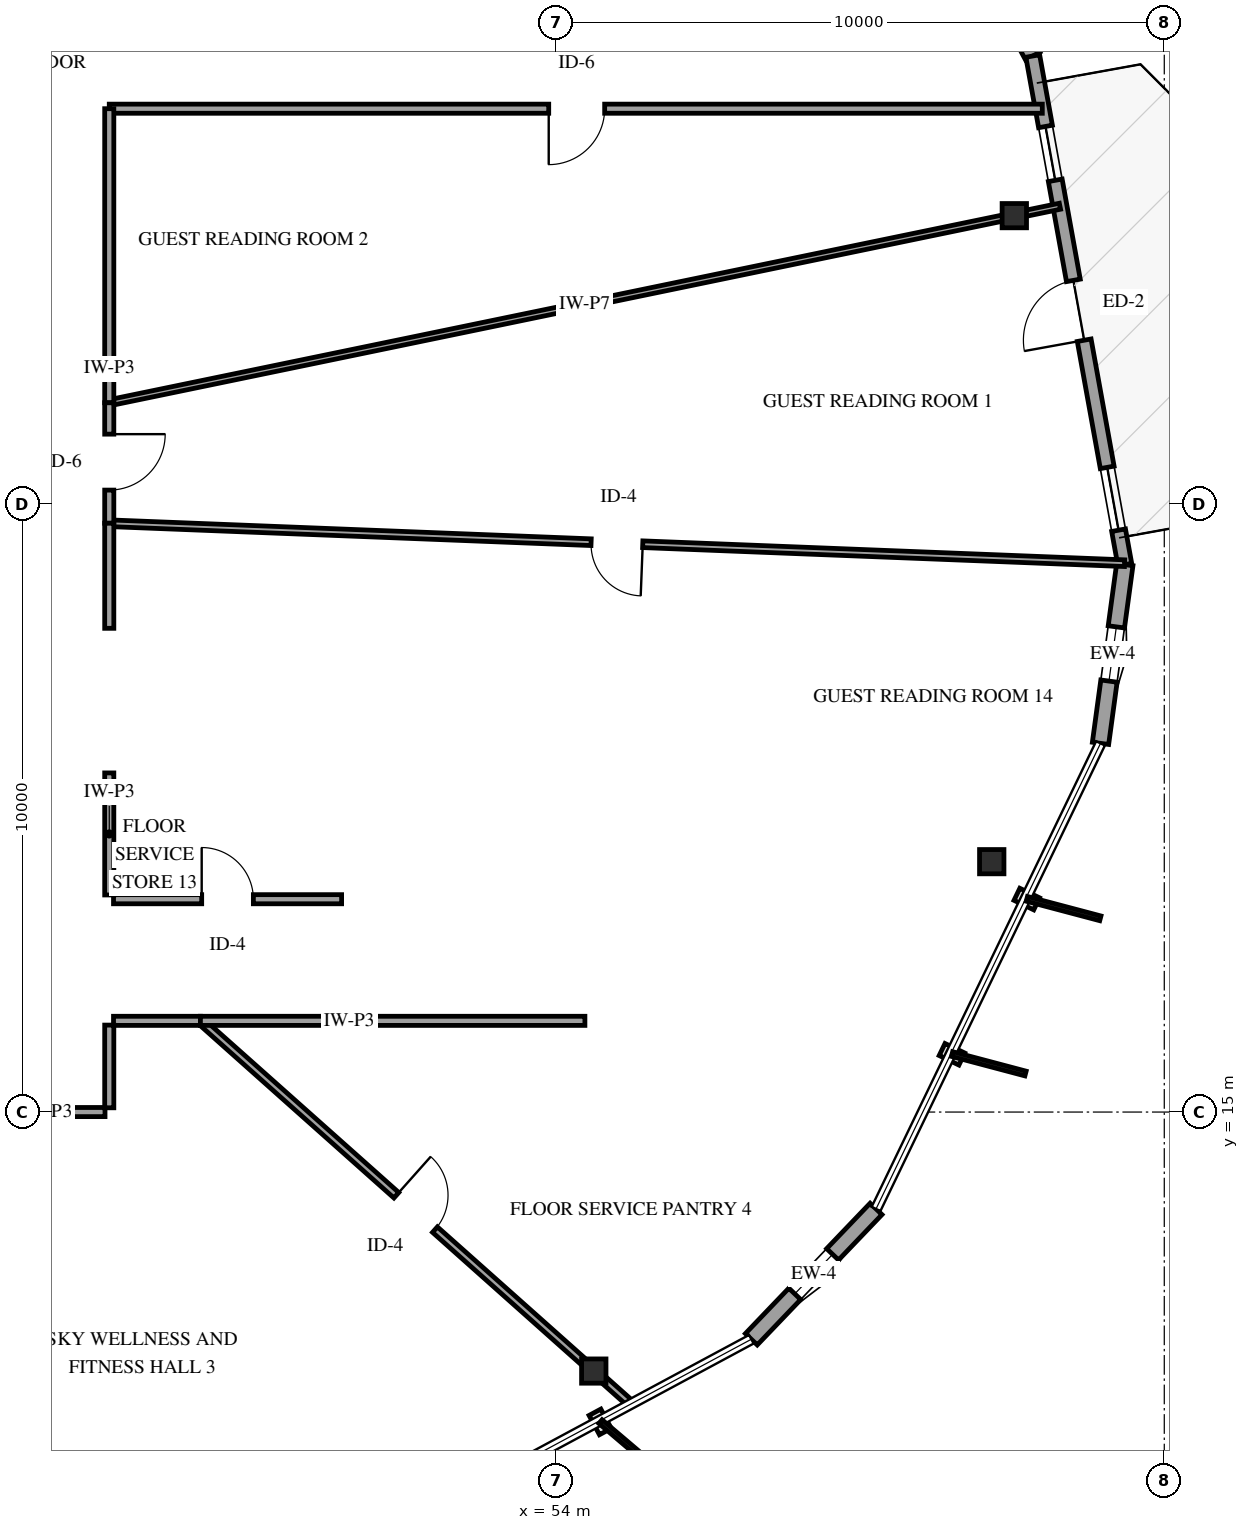
"""IFC4 building model, lengths in metres.
Left out: names, types, materials, properties, quantities, classifications, styles, units other than length and angle.
Written with IfcOpenShell. Run it as: python <this file> out.ifc"""

import sys

from ifc_helpers import new_model, si_unit, direction, frame, frame_2d, origin, origin_2d, place, context, subcontext, project, spatial, rectangle, i_section, extrude, element, fill, save


model = new_model("IFC4")
c1 = context("Model", 3, precision=1e-05, world=origin(), true_north=direction((0.0, 1.0)))
c2 = subcontext(c1, "Body", "Model", "MODEL_VIEW")
j1 = project(units=[si_unit("LENGTHUNIT", "METRE"), si_unit("PLANEANGLEUNIT", "RADIAN")], contexts=[c1])
p1 = place(None, origin())
s1 = spatial("IfcSite", under=j1, at=p1, CompositionType="ELEMENT")
p2 = place(p1, origin())
s2 = spatial("IfcBuilding", under=s1, at=p2, CompositionType="ELEMENT")
p3 = place(p2, frame((0.0, 0.0, 268.75)))
s3 = spatial("IfcBuildingStorey", under=s2, at=p3, CompositionType="ELEMENT", Elevation=268.75)
for number, where, z_axis, x_axis in (
    (1, (61.534, 29.741, 0.0), (0.0, 0.0, 1.0), (1.0, 0.0, 0.0)),
    (2, (54.618, 10.74, 0.0), (0.0, 0.0, 1.0), (1.0, 0.0, 0.0)),
    (3, (61.163, 19.117, 0.0), (0.0, 0.0, 1.0), (1.0, 0.0, 0.0)),
):
    element("IfcColumn", number, at=place(p3, frame(where, z_axis=z_axis, x_axis=x_axis)), inside=s3, PredefinedType="COLUMN", context=c2, shape_type="SweptSolid", body=[
        extrude(i_section(OverallWidth=0.401, OverallDepth=0.399, WebThickness=0.025, FlangeThickness=0.04, FilletRadius=0.038, at=origin_2d()), origin(), (0.0, 0.0, 1.0), 3.75),
    ])
p4 = place(p3, frame((57.209, 11.263, 0.0), z_axis=(0.0, 0.0, 1.0), x_axis=(0.691381456172, 0.722489918311, 0.0)))
e4 = element("IfcWall", 4, at=p4, inside=s3, PredefinedType="SOLIDWALL", context=c2, shape_type="SweptSolid", body=[
    extrude(rectangle(XDim=2.967, YDim=0.27, at=frame_2d((1.483, 0.0))), origin(), (0.0, 0.0, 1.0), 2.829),
])
p5 = place(p4, frame((1.033, 0.0, 0.75)))
e5 = element("IfcOpeningElement", 5, at=p5, cuts=e4, PredefinedType="OPENING", context=c2, shape_type="SweptSolid", body=[
    extrude(rectangle(XDim=0.9, YDim=1.5, at=frame_2d((0.45, 0.75))), frame((0.0, 0.145, 0.0), z_axis=(0.0, -1.0, 0.0), x_axis=(1.0, 0.0, 0.0)), (0.0, 0.0, 1.0), 0.29),
])
p6 = place(p3, frame((62.951, 21.063, 0.0), z_axis=(0.0, 0.0, 1.0), x_axis=(0.134643093572, 0.99089416052, 0.0)))
e6 = element("IfcWall", 6, at=p6, inside=s3, PredefinedType="SOLIDWALL", context=c2, shape_type="SweptSolid", body=[
    extrude(rectangle(XDim=2.967, YDim=0.27, at=frame_2d((1.483, 0.0))), origin(), (0.0, 0.0, 1.0), 2.829),
])
p7 = place(p6, frame((1.033, 0.0, 0.75)))
e7 = element("IfcOpeningElement", 7, at=p7, cuts=e6, PredefinedType="OPENING", context=c2, shape_type="SweptSolid", body=[
    extrude(rectangle(XDim=0.9, YDim=1.5, at=frame_2d((0.45, 0.75))), frame((0.0, 0.145, 0.0), z_axis=(0.0, -1.0, 0.0), x_axis=(1.0, 0.0, 0.0)), (0.0, 0.0, 1.0), 0.29),
])
p8 = place(p3, frame((61.837, 32.367, 0.0), z_axis=(0.0, 0.0, 1.0), x_axis=(-0.473486214629, 0.880801228744, 0.0)))
e8 = element("IfcWall", 8, at=p8, inside=s3, PredefinedType="SOLIDWALL", context=c2, shape_type="SweptSolid", body=[
    extrude(rectangle(XDim=2.966, YDim=0.27, at=frame_2d((1.483, 0.0))), origin(), (0.0, 0.0, 1.0), 2.829),
])
p9 = place(p3, frame((63.351, 24.003, 0.0), z_axis=(0.0, 0.0, 1.0), x_axis=(-0.178109410328, 0.984010689958, 0.0)))
e9 = element("IfcWall", 9, at=p9, inside=s3, PredefinedType="SOLIDWALL", context=c2, shape_type="SweptSolid", body=[
    extrude(rectangle(XDim=8.5, YDim=0.23, at=frame_2d((4.25, 0.0))), origin(), (0.0, 0.0, 1.0), 2.829),
])
p10 = place(p9, frame((3.75, 0.0, 0.0)))
e10 = element("IfcOpeningElement", 10, at=p10, cuts=e9, PredefinedType="OPENING", context=c2, shape_type="SweptSolid", body=[
    extrude(rectangle(XDim=1.0, YDim=2.15, at=frame_2d((0.5, 1.075))), frame((0.0, 0.125, 0.0), z_axis=(0.0, -1.0, 0.0), x_axis=(1.0, 0.0, 0.0)), (0.0, 0.0, 1.0), 0.25),
])
p11 = place(p9, frame((0.575, 0.0, 0.72)))
e11 = element("IfcOpeningElement", 11, at=p11, cuts=e9, PredefinedType="OPENING", context=c2, shape_type="SweptSolid", body=[
    extrude(rectangle(XDim=1.05, YDim=1.55, at=frame_2d((0.525, 0.775))), frame((0.0, 0.125, 0.0), z_axis=(0.0, -1.0, 0.0), x_axis=(1.0, 0.0, 0.0)), (0.0, 0.0, 1.0), 0.25),
])
p12 = place(p9, frame((6.422, 0.0, 0.72)))
e12 = element("IfcOpeningElement", 12, at=p12, cuts=e9, PredefinedType="OPENING", context=c2, shape_type="SweptSolid", body=[
    extrude(rectangle(XDim=0.9, YDim=1.5, at=frame_2d((0.45, 0.75))), frame((0.0, 0.125, 0.0), z_axis=(0.0, -1.0, 0.0), x_axis=(1.0, 0.0, 0.0)), (0.0, 0.0, 1.0), 0.25),
])
p13 = place(p3, frame((63.347, 24.026, 0.0), z_axis=(0.0, 0.0, 1.0), x_axis=(-0.999226219276, 0.039331446861, 0.0)))
e13 = element("IfcWall", 13, at=p13, inside=s3, PredefinedType="PARTITIONING", context=c2, shape_type="SweptSolid", body=[
    extrude(rectangle(XDim=16.71, YDim=0.11, at=frame_2d((8.355, 0.0))), origin(), (0.0, 0.0, 1.0), 3.45),
])
p14 = place(p13, frame((7.93, 0.0, 0.0)))
e14 = element("IfcOpeningElement", 14, at=p14, cuts=e13, PredefinedType="OPENING", context=c2, shape_type="SweptSolid", body=[
    extrude(rectangle(XDim=0.85, YDim=2.1, at=frame_2d((0.425, 1.05))), frame((0.0, 0.065, 0.0), z_axis=(0.0, -1.0, 0.0), x_axis=(1.0, 0.0, 0.0)), (0.0, 0.0, 1.0), 0.13),
])
p15 = place(p3, frame((46.65, 26.664, 0.0), z_axis=(0.0, 0.0, 1.0), x_axis=(0.979293886002, 0.202443781921, 0.0)))
e15 = element("IfcWall", 15, at=p15, inside=s3, PredefinedType="PARTITIONING", context=c2, shape_type="SweptSolid", body=[
    extrude(rectangle(XDim=15.965, YDim=0.1, at=frame_2d((7.982, 0.0))), origin(), (0.0, 0.0, 1.0), 2.745),
])
p16 = place(p3, frame((61.994, 31.5, 0.0), z_axis=(0.0, 0.0, 1.0), x_axis=(-1.0, 0.0, 0.0)))
e16 = element("IfcWall", 16, at=p16, inside=s3, PredefinedType="PARTITIONING", context=c2, shape_type="SweptSolid", body=[
    extrude(rectangle(XDim=15.344, YDim=0.15, at=frame_2d((7.672, 0.0))), origin(), (0.0, 0.0, 1.0), 2.824),
])
p17 = place(p16, frame((7.197, 0.0, 0.0)))
e17 = element("IfcOpeningElement", 17, at=p17, cuts=e16, PredefinedType="OPENING", context=c2, shape_type="SweptSolid", body=[
    extrude(rectangle(XDim=0.92, YDim=2.12, at=frame_2d((0.46, 1.06))), frame((0.0, 0.085, 0.0), z_axis=(0.0, -1.0, 0.0), x_axis=(1.0, 0.0, 0.0)), (0.0, 0.0, 1.0), 0.17),
])
p18 = place(p3, frame((48.149, 16.5, 0.0), z_axis=(0.0, 0.0, 1.0), x_axis=(0.746964286296, -0.664864162816, 0.0)))
e18 = element("IfcWall", 18, at=p18, inside=s3, PredefinedType="PARTITIONING", context=c2, shape_type="SweptSolid", body=[
    extrude(rectangle(XDim=9.477, YDim=0.12, at=frame_2d((4.739, 0.0))), origin(), (0.0, 0.0, 1.0), 3.45),
])
p19 = place(p18, frame((4.314, 0.0, 0.0)))
e19 = element("IfcOpeningElement", 19, at=p19, cuts=e18, PredefinedType="OPENING", context=c2, shape_type="SweptSolid", body=[
    extrude(rectangle(XDim=0.85, YDim=2.1, at=frame_2d((0.425, 1.05))), frame((0.0, 0.07, 0.0), z_axis=(0.0, -1.0, 0.0), x_axis=(1.0, 0.0, 0.0)), (0.0, 0.0, 1.0), 0.14),
])
p20 = place(p3, frame((46.65, 31.5, 0.0), z_axis=(0.0, 0.0, 1.0), x_axis=(0.0, -1.0, 0.0)))
e20 = element("IfcWall", 20, at=p20, inside=s3, PredefinedType="PARTITIONING", context=c2, shape_type="SweptSolid", body=[
    extrude(rectangle(XDim=4.836, YDim=0.15, at=frame_2d((2.418, 0.0))), origin(), (0.0, 0.0, 1.0), 3.45),
])
p21 = place(p3, frame((46.65, 26.664, 0.0), z_axis=(0.0, 0.0, 1.0), x_axis=(0.0, -1.0, 0.0)))
e21 = element("IfcWall", 21, at=p21, inside=s3, PredefinedType="PARTITIONING", context=c2, shape_type="SweptSolid", body=[
    extrude(rectangle(XDim=1.981, YDim=0.15, at=frame_2d((0.99, 0.0))), origin(), (0.0, 0.0, 1.0), 3.45),
])
p22 = place(p21, frame((0.516, 0.0, 0.0)))
e22 = element("IfcOpeningElement", 22, at=p22, cuts=e21, PredefinedType="OPENING", context=c2, shape_type="SweptSolid", body=[
    extrude(rectangle(XDim=0.92, YDim=2.12, at=frame_2d((0.46, 1.06))), frame((0.0, 0.085, 0.0), z_axis=(0.0, -1.0, 0.0), x_axis=(1.0, 0.0, 0.0)), (0.0, 0.0, 1.0), 0.17),
])
p23 = place(p3, frame((46.58, 15.0, 0.0), z_axis=(0.0, 0.0, 1.0), x_axis=(-1.0, 0.0, 0.0)))
e23 = element("IfcWall", 23, at=p23, inside=s3, PredefinedType="PARTITIONING", context=c2, shape_type="SweptSolid", body=[
    extrude(rectangle(XDim=1.91, YDim=0.15, at=frame_2d((0.955, 0.0))), origin(), (0.0, 0.0, 1.0), 3.45),
])
p24 = place(p3, frame((48.149, 16.5, 0.0), z_axis=(0.0, 0.0, 1.0), x_axis=(-1.0, 0.0, 0.0)))
e24 = element("IfcWall", 24, at=p24, inside=s3, PredefinedType="PARTITIONING", context=c2, shape_type="SweptSolid", body=[
    extrude(rectangle(XDim=1.429, YDim=0.15, at=frame_2d((0.714, 0.0))), origin(), (0.0, 0.0, 1.0), 2.828),
])
p25 = place(p3, frame((46.65, 16.43, 0.0), z_axis=(0.0, 0.0, 1.0), x_axis=(0.0, -1.0, 0.0)))
e25 = element("IfcWall", 25, at=p25, inside=s3, PredefinedType="PARTITIONING", context=c2, shape_type="SweptSolid", body=[
    extrude(rectangle(XDim=1.36, YDim=0.15, at=frame_2d((0.68, 0.0))), origin(), (0.0, 0.0, 1.0), 3.45),
])
p26 = place(p3, frame((54.472, 16.5, 0.0), z_axis=(0.0, 0.0, 1.0), x_axis=(-1.0, 0.0, 0.0)))
e26 = element("IfcWall", 26, at=p26, inside=s3, PredefinedType="PARTITIONING", context=c2, shape_type="SweptSolid", body=[
    extrude(rectangle(XDim=6.323, YDim=0.15, at=frame_2d((3.162, 0.0))), origin(), (0.0, 0.0, 1.0), 2.828),
])
p27 = place(p3, frame((46.72, 18.5, 0.0), z_axis=(0.0, 0.0, 1.0), x_axis=(1.0, 0.0, 0.0)))
e27 = element("IfcWall", 27, at=p27, inside=s3, PredefinedType="PARTITIONING", context=c2, shape_type="SweptSolid", body=[
    extrude(rectangle(XDim=3.751, YDim=0.15, at=frame_2d((1.875, 0.0))), origin(), (0.0, 0.0, 1.0), 2.745),
])
p28 = place(p27, frame((1.45, 0.0, 0.0)))
e28 = element("IfcOpeningElement", 28, at=p28, cuts=e27, PredefinedType="OPENING", context=c2, shape_type="SweptSolid", body=[
    extrude(rectangle(XDim=0.85, YDim=2.1, at=frame_2d((0.425, 1.05))), frame((0.0, 0.085, 0.0), z_axis=(0.0, -1.0, 0.0), x_axis=(1.0, 0.0, 0.0)), (0.0, 0.0, 1.0), 0.17),
])
p29 = place(p3, frame((46.65, 20.577, 0.0), z_axis=(0.0, 0.0, 1.0), x_axis=(0.0, -1.0, 0.0)))
e29 = element("IfcWall", 29, at=p29, inside=s3, PredefinedType="PARTITIONING", context=c2, shape_type="SweptSolid", body=[
    extrude(rectangle(XDim=2.007, YDim=0.15, at=frame_2d((1.003, 0.0))), origin(), (0.0, 0.0, 1.0), 3.45),
])
p30 = place(p3, frame((46.65, 24.683, 0.0), z_axis=(0.0, 0.0, 1.0), x_axis=(0.0, -1.0, 0.0)))
e30 = element("IfcWall", 30, at=p30, inside=s3, PredefinedType="PARTITIONING", context=c2, shape_type="SweptSolid", body=[
    extrude(rectangle(XDim=1.728, YDim=0.15, at=frame_2d((0.864, 0.0))), origin(), (0.0, 0.0, 1.0), 3.45),
])
p31 = place(p5, origin())
e31 = element("IfcWindow", 31, at=p31, inside=s3, PartitioningType="SINGLE_PANEL", PredefinedType="WINDOW", context=c2, shape_type="SweptSolid", body=[
    extrude(rectangle(XDim=0.9, YDim=1.5, at=frame_2d((0.45, 0.75))), frame((0.0, 0.03, 0.0), z_axis=(0.0, -1.0, 0.0), x_axis=(1.0, 0.0, 0.0)), (0.0, 0.0, 1.0), 0.06),
])
fill(e5, e31)
p32 = place(p7, origin())
e32 = element("IfcWindow", 32, at=p32, inside=s3, PartitioningType="SINGLE_PANEL", PredefinedType="WINDOW", context=c2, shape_type="SweptSolid", body=[
    extrude(rectangle(XDim=0.9, YDim=1.5, at=frame_2d((0.45, 0.75))), frame((0.0, 0.03, 0.0), z_axis=(0.0, -1.0, 0.0), x_axis=(1.0, 0.0, 0.0)), (0.0, 0.0, 1.0), 0.06),
])
fill(e7, e32)
p33 = place(p10, origin())
e33 = element("IfcDoor", 33, at=p33, inside=s3, OperationType="SINGLE_SWING_LEFT", PredefinedType="DOOR", context=c2, shape_type="SweptSolid", body=[
    extrude(rectangle(XDim=1.0, YDim=2.15, at=frame_2d((0.5, 1.075))), frame((0.0, 0.025, 0.0), z_axis=(0.0, -1.0, 0.0), x_axis=(1.0, 0.0, 0.0)), (0.0, 0.0, 1.0), 0.05),
])
fill(e10, e33)
p34 = place(p11, origin())
e34 = element("IfcWindow", 34, at=p34, inside=s3, PartitioningType="SINGLE_PANEL", PredefinedType="WINDOW", context=c2, shape_type="SweptSolid", body=[
    extrude(rectangle(XDim=1.05, YDim=1.55, at=frame_2d((0.525, 0.775))), frame((0.0, 0.03, 0.0), z_axis=(0.0, -1.0, 0.0), x_axis=(1.0, 0.0, 0.0)), (0.0, 0.0, 1.0), 0.06),
])
fill(e11, e34)
p35 = place(p12, origin())
e35 = element("IfcWindow", 35, at=p35, inside=s3, PartitioningType="SINGLE_PANEL", PredefinedType="WINDOW", context=c2, shape_type="SweptSolid", body=[
    extrude(rectangle(XDim=0.9, YDim=1.5, at=frame_2d((0.45, 0.75))), frame((0.0, 0.03, 0.0), z_axis=(0.0, -1.0, 0.0), x_axis=(1.0, 0.0, 0.0)), (0.0, 0.0, 1.0), 0.06),
])
fill(e12, e35)
p36 = place(p14, origin())
e36 = element("IfcDoor", 36, at=p36, inside=s3, OperationType="SINGLE_SWING_LEFT", PredefinedType="DOOR", context=c2, shape_type="SweptSolid", body=[
    extrude(rectangle(XDim=0.85, YDim=2.1, at=frame_2d((0.425, 1.05))), frame((0.0, 0.025, 0.0), z_axis=(0.0, -1.0, 0.0), x_axis=(1.0, 0.0, 0.0)), (0.0, 0.0, 1.0), 0.05),
])
fill(e14, e36)
p37 = place(p17, origin())
e37 = element("IfcDoor", 37, at=p37, inside=s3, OperationType="SINGLE_SWING_RIGHT", PredefinedType="DOOR", context=c2, shape_type="SweptSolid", body=[
    extrude(rectangle(XDim=0.92, YDim=2.12, at=frame_2d((0.46, 1.06))), frame((0.0, 0.025, 0.0), z_axis=(0.0, -1.0, 0.0), x_axis=(1.0, 0.0, 0.0)), (0.0, 0.0, 1.0), 0.05),
])
fill(e17, e37)
p38 = place(p19, origin())
e38 = element("IfcDoor", 38, at=p38, inside=s3, OperationType="SINGLE_SWING_LEFT", PredefinedType="DOOR", context=c2, shape_type="SweptSolid", body=[
    extrude(rectangle(XDim=0.85, YDim=2.1, at=frame_2d((0.425, 1.05))), frame((0.0, 0.025, 0.0), z_axis=(0.0, -1.0, 0.0), x_axis=(1.0, 0.0, 0.0)), (0.0, 0.0, 1.0), 0.05),
])
fill(e19, e38)
p39 = place(p22, origin())
e39 = element("IfcDoor", 39, at=p39, inside=s3, OperationType="SINGLE_SWING_LEFT", PredefinedType="DOOR", context=c2, shape_type="SweptSolid", body=[
    extrude(rectangle(XDim=0.92, YDim=2.12, at=frame_2d((0.46, 1.06))), frame((0.0, 0.025, 0.0), z_axis=(0.0, -1.0, 0.0), x_axis=(1.0, 0.0, 0.0)), (0.0, 0.0, 1.0), 0.05),
])
fill(e22, e39)
p40 = place(p28, origin())
e40 = element("IfcDoor", 40, at=p40, inside=s3, OperationType="SINGLE_SWING_LEFT", PredefinedType="DOOR", context=c2, shape_type="SweptSolid", body=[
    extrude(rectangle(XDim=0.85, YDim=2.1, at=frame_2d((0.425, 1.05))), frame((0.0, 0.025, 0.0), z_axis=(0.0, -1.0, 0.0), x_axis=(1.0, 0.0, 0.0)), (0.0, 0.0, 1.0), 0.05),
])
fill(e28, e40)
save(model, sys.argv[1])
